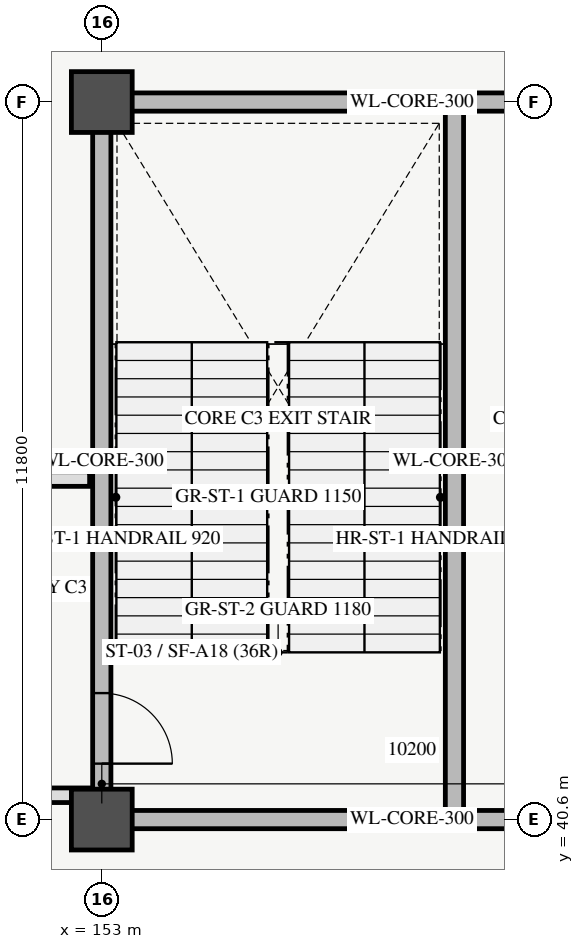
"""IFC4 building model, lengths in metres.
Left out: names, types, materials, properties, quantities, classifications, styles, units other than length and angle.
Written with IfcOpenShell. Run it as: python <this file> out.ifc"""

import sys

from ifc_helpers import new_model, si_unit, direction, frame, frame_2d, origin, origin_2d, place, context, subcontext, project, spatial, rectangle, circle, extrude, element, fill, save


model = new_model("IFC4")
c1 = context("Model", 3, precision=1e-05, world=origin(), true_north=direction((0.0, 1.0)))
c2 = subcontext(c1, "Body", "Model", "MODEL_VIEW")
j1 = project(units=[si_unit("LENGTHUNIT", "METRE"), si_unit("PLANEANGLEUNIT", "RADIAN")], contexts=[c1])
p1 = place(None, origin())
s1 = spatial("IfcSite", under=j1, at=p1, CompositionType="ELEMENT")
p2 = place(p1, origin())
s2 = spatial("IfcBuilding", under=s1, at=p2, CompositionType="ELEMENT")
p3 = place(p2, origin())
s3 = spatial("IfcBuildingStorey", under=s2, at=p3, CompositionType="ELEMENT", Elevation=0.0)
for number, where, z_axis, x_axis in (
    (1, (153.0, 40.6, 0.0), (0.0, 0.0, 1.0), (1.0, 0.0, 0.0)),
    (2, (153.0, 52.4, 0.0), (0.0, 0.0, 1.0), (1.0, 0.0, 0.0)),
):
    element("IfcColumn", number, at=place(p3, frame(where, z_axis=z_axis, x_axis=x_axis)), inside=s3, PredefinedType="COLUMN", context=c2, shape_type="SweptSolid", body=[
        extrude(circle(Radius=0.5, at=origin_2d()), origin(), (0.0, 0.0, 1.0), 5.4),
    ])
p4 = place(p3, frame((153.0, 40.6, 0.0), z_axis=(0.0, 0.0, 1.0), x_axis=(1.0, 0.0, 0.0)))
e3 = element("IfcWall", 3, at=p4, inside=s3, PredefinedType="SHEAR", context=c2, shape_type="SweptSolid", body=[
    extrude(rectangle(XDim=10.2, YDim=0.3, at=frame_2d((5.1, 0.0))), origin(), (0.0, 0.0, 1.0), 5.4),
])
p5 = place(p4, frame((7.4, 0.0, 0.0)))
e4 = element("IfcOpeningElement", 4, at=p5, cuts=e3, PredefinedType="OPENING", context=c2, shape_type="SweptSolid", body=[
    extrude(rectangle(XDim=1.2, YDim=2.25, at=frame_2d((0.6, 1.125))), frame((0.0, 0.16, 0.0), z_axis=(0.0, -1.0, 0.0), x_axis=(1.0, 0.0, 0.0)), (0.0, 0.0, 1.0), 0.32),
])
p6 = place(p3, frame((153.0, 52.4, 0.0), z_axis=(0.0, 0.0, 1.0), x_axis=(1.0, 0.0, 0.0)))
e5 = element("IfcWall", 5, at=p6, inside=s3, PredefinedType="SHEAR", context=c2, shape_type="SweptSolid", body=[
    extrude(rectangle(XDim=10.2, YDim=0.3, at=frame_2d((5.1, 0.0))), origin(), (0.0, 0.0, 1.0), 5.4),
])
p7 = place(p3, frame((153.0, 40.6, 0.0), z_axis=(0.0, 0.0, 1.0), x_axis=(0.0, 1.0, 0.0)))
e6 = element("IfcWall", 6, at=p7, inside=s3, PredefinedType="SHEAR", context=c2, shape_type="SweptSolid", body=[
    extrude(rectangle(XDim=11.8, YDim=0.3, at=frame_2d((5.9, 0.0))), origin(), (0.0, 0.0, 1.0), 5.4),
])
p8 = place(p7, frame((0.92, 0.0, 0.0)))
e7 = element("IfcOpeningElement", 7, at=p8, cuts=e6, PredefinedType="OPENING", context=c2, shape_type="SweptSolid", body=[
    extrude(rectangle(XDim=1.16, YDim=2.2, at=frame_2d((0.58, 1.1))), frame((0.0, 0.16, 0.0), z_axis=(0.0, -1.0, 0.0), x_axis=(1.0, 0.0, 0.0)), (0.0, 0.0, 1.0), 0.32),
])
p9 = place(p3, frame((158.8, 40.75, 0.0), z_axis=(0.0, 0.0, 1.0), x_axis=(0.0, 1.0, 0.0)))
e8 = element("IfcWall", 8, at=p9, inside=s3, PredefinedType="SHEAR", context=c2, shape_type="SweptSolid", body=[
    extrude(rectangle(XDim=11.5, YDim=0.3, at=frame_2d((5.75, 0.0))), origin(), (0.0, 0.0, 1.0), 5.4),
])
for number, where, z_axis, x_axis in (
    (9, (148.0, 46.2, 0.0), (0.0, 0.0, 1.0), (1.0, 0.0, 0.0)),
    (10, (148.0, 41.0, 0.0), (0.0, 0.0, 1.0), (1.0, 0.0, 0.0)),
):
    element("IfcWall", number, at=place(p3, frame(where, z_axis=z_axis, x_axis=x_axis)), inside=s3, PredefinedType="PARTITIONING", context=c2, shape_type="SweptSolid", body=[
        extrude(rectangle(XDim=4.8, YDim=0.24, at=frame_2d((2.4, 0.0))), origin(), (0.0, 0.0, 1.0), 4.08),
    ])
p10 = place(p8, origin())
e11 = element("IfcDoor", 11, at=p10, inside=s3, OperationType="SINGLE_SWING_LEFT", PredefinedType="DOOR", context=c2, shape_type="SweptSolid", body=[
    extrude(rectangle(XDim=1.16, YDim=2.2, at=frame_2d((0.58, 1.1))), frame((0.0, 0.025, 0.0), z_axis=(0.0, -1.0, 0.0), x_axis=(1.0, 0.0, 0.0)), (0.0, 0.0, 1.0), 0.05),
])
fill(e7, e11)
save(model, sys.argv[1])
